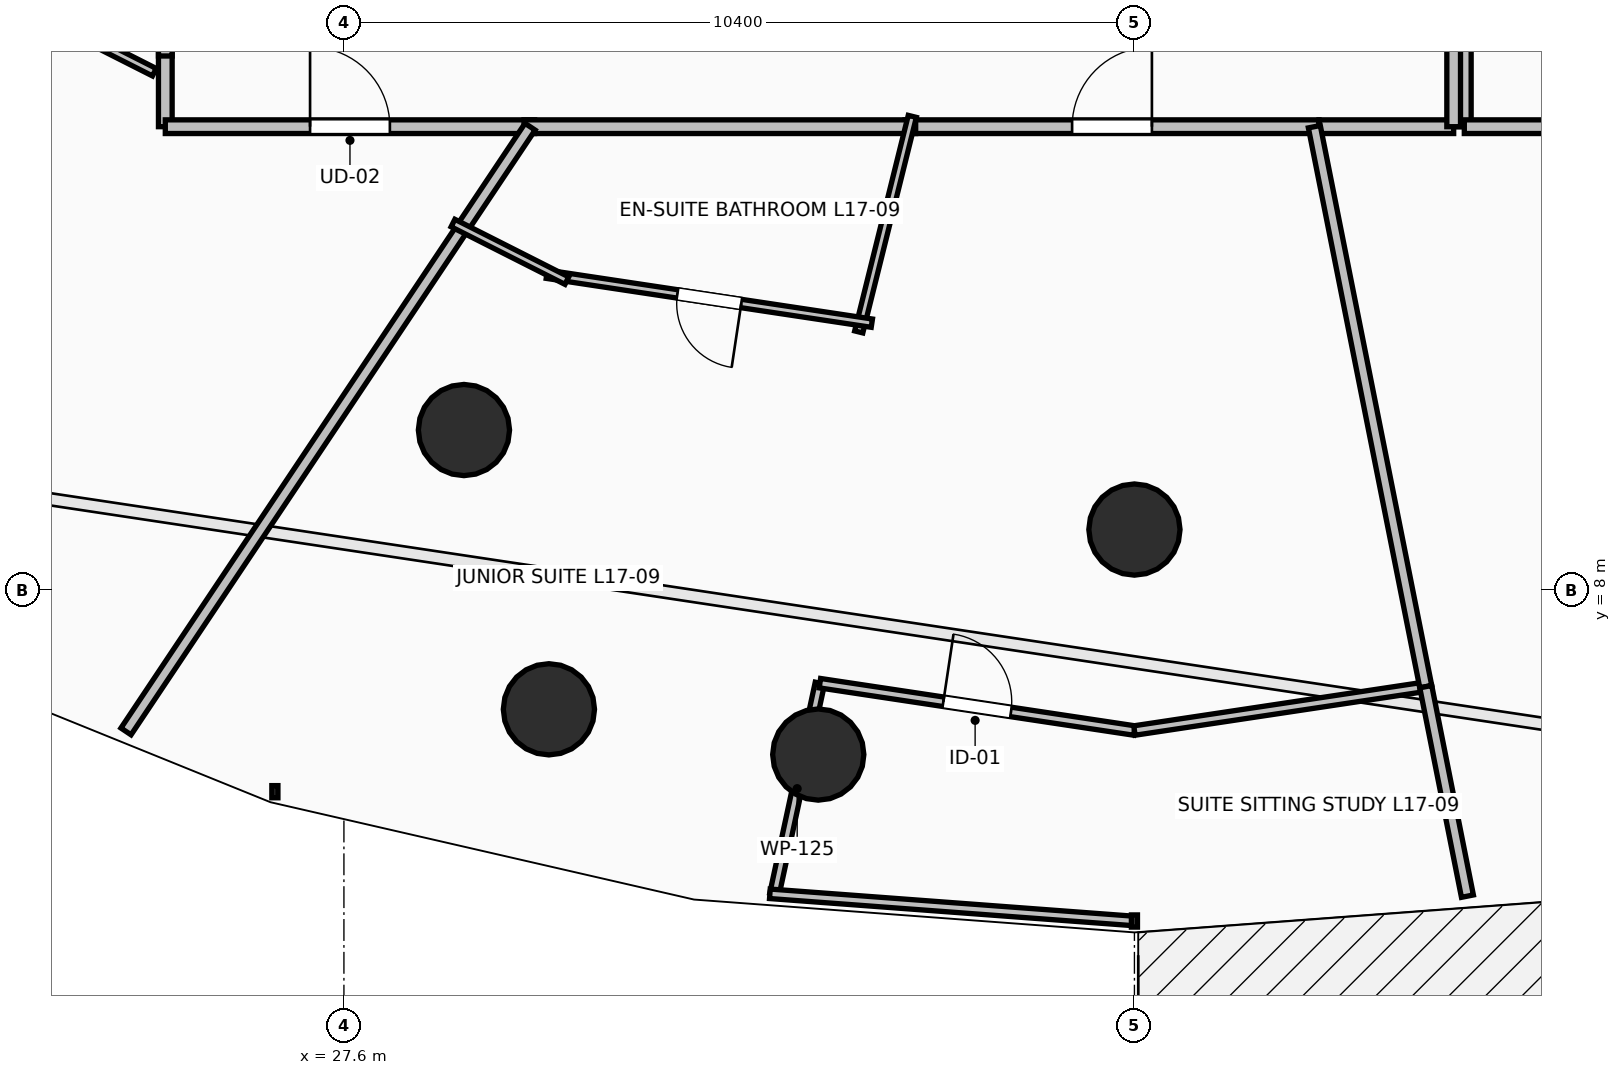
"""IFC4 building model, lengths in metres.
Left out: names, types, materials, properties, quantities, classifications, styles, units other than length and angle.
Written with IfcOpenShell. Run it as: python <this file> out.ifc"""

import sys

from ifc_helpers import new_model, si_unit, direction, frame, frame_2d, origin, origin_2d, place, context, subcontext, project, spatial, rectangle, circle, extrude, element, fill, save


model = new_model("IFC4")
c1 = context("Model", 3, precision=1e-05, world=origin(), true_north=direction((0.0, 1.0)))
c2 = subcontext(c1, "Body", "Model", "MODEL_VIEW")
j1 = project(units=[si_unit("LENGTHUNIT", "METRE"), si_unit("PLANEANGLEUNIT", "RADIAN")], contexts=[c1])
p1 = place(None, origin())
s1 = spatial("IfcSite", under=j1, at=p1, CompositionType="ELEMENT")
p2 = place(p1, origin())
s2 = spatial("IfcBuilding", under=s1, at=p2, CompositionType="ELEMENT")
p3 = place(p2, frame((0.0, 0.0, 66.0)))
s3 = spatial("IfcBuildingStorey", under=s2, at=p3, CompositionType="ELEMENT", Elevation=66.0)
for number, where, z_axis, x_axis in (
    (1, (29.179, 10.109, 0.0), (0.0, 0.0, 1.0), (-0.383, -0.924, 0.0)),
    (2, (38.0, 8.8, 0.0), (0.0, 0.0, 1.0), (0.0, -1.0, 0.0)),
    (3, (30.297, 6.435, 0.0), (0.0, 0.0, 1.0), (-0.383, -0.924, 0.0)),
    (4, (33.84, 5.84, 0.0), (0.0, 0.0, 1.0), (0.0, -1.0, 0.0)),
):
    element("IfcColumn", number, at=place(p3, frame(where, z_axis=z_axis, x_axis=x_axis)), inside=s3, PredefinedType="COLUMN", context=c2, shape_type="SweptSolid", body=[
        extrude(circle(Radius=0.6, at=origin_2d()), origin(), (0.0, 0.0, 1.0), 3.5),
    ])
p4 = place(p3, frame((25.25, 15.17, 0.0), z_axis=(0.0, 0.0, 1.0), x_axis=(0.0, -1.0, 0.0)))
e5 = element("IfcWall", 5, at=p4, inside=s3, PredefinedType="PARTITIONING", context=c2, shape_type="SweptSolid", body=[
    extrude(rectangle(XDim=1.07, YDim=0.18, at=frame_2d((0.535, 0.0))), origin(), (0.0, 0.0, 1.0), 2.784),
])
p5 = place(p3, frame((25.25, 14.1, 0.0), z_axis=(0.0, 0.0, 1.0), x_axis=(1.0, 0.0, 0.0)))
e6 = element("IfcWall", 6, at=p5, inside=s3, PredefinedType="PARTITIONING", context=c2, shape_type="SweptSolid", body=[
    extrude(rectangle(XDim=4.859, YDim=0.18, at=frame_2d((2.429, 0.0))), origin(), (0.0, 0.0, 1.0), 2.342),
])
p6 = place(p5, frame((1.905, 0.0, 0.0)))
e7 = element("IfcOpeningElement", 7, at=p6, cuts=e6, PredefinedType="OPENING", context=c2, shape_type="SweptSolid", body=[
    extrude(rectangle(XDim=1.05, YDim=2.2, at=frame_2d((0.525, 1.1))), frame((0.0, 0.105, 0.0), z_axis=(0.0, -1.0, 0.0), x_axis=(1.0, 0.0, 0.0)), (0.0, 0.0, 1.0), 0.21),
])
p7 = place(p3, frame((25.25, 19.257, 0.0), z_axis=(0.0, 0.0, 1.0), x_axis=(0.0, -1.0, 0.0)))
e8 = element("IfcWall", 8, at=p7, inside=s3, PredefinedType="PARTITIONING", context=c2, shape_type="SweptSolid", body=[
    extrude(rectangle(XDim=4.227, YDim=0.18, at=frame_2d((2.114, 0.0))), origin(), (0.0, 0.0, 1.0), 2.342),
])
p8 = place(p3, frame((34.982, 14.1, 0.0), z_axis=(0.0, 0.0, 1.0), x_axis=(1.0, 0.0, 0.0)))
e9 = element("IfcWall", 9, at=p8, inside=s3, PredefinedType="PARTITIONING", context=c2, shape_type="SweptSolid", body=[
    extrude(rectangle(XDim=5.446, YDim=0.18, at=frame_2d((2.723, 0.0))), origin(), (0.0, 0.0, 1.0), 3.15),
])
p9 = place(p8, frame((2.198, 0.0, 0.0)))
e10 = element("IfcOpeningElement", 10, at=p9, cuts=e9, PredefinedType="OPENING", context=c2, shape_type="SweptSolid", body=[
    extrude(rectangle(XDim=1.05, YDim=2.2, at=frame_2d((0.525, 1.1))), frame((0.0, 0.105, 0.0), z_axis=(0.0, -1.0, 0.0), x_axis=(1.0, 0.0, 0.0)), (0.0, 0.0, 1.0), 0.21),
])
p10 = place(p3, frame((29.969, 14.1, 0.0), z_axis=(0.0, 0.0, 1.0), x_axis=(1.0, 0.0, 0.0)))
e11 = element("IfcWall", 11, at=p10, inside=s3, PredefinedType="PARTITIONING", context=c2, shape_type="SweptSolid", body=[
    extrude(rectangle(XDim=5.153, YDim=0.18, at=frame_2d((2.577, 0.0))), origin(), (0.0, 0.0, 1.0), 3.15),
])
p11 = place(p3, frame((42.34, 16.24, 0.0), z_axis=(0.0, 0.0, 1.0), x_axis=(0.0, -1.0, 0.0)))
e12 = element("IfcWall", 12, at=p11, inside=s3, PredefinedType="PARTITIONING", context=c2, shape_type="SweptSolid", body=[
    extrude(rectangle(XDim=2.14, YDim=0.18, at=frame_2d((1.07, 0.0))), origin(), (0.0, 0.0, 1.0), 3.15),
])
p12 = place(p3, frame((42.34, 14.1, 0.0), z_axis=(0.0, 0.0, 1.0), x_axis=(1.0, 0.0, 0.0)))
e13 = element("IfcWall", 13, at=p12, inside=s3, PredefinedType="PARTITIONING", context=c2, shape_type="SweptSolid", body=[
    extrude(rectangle(XDim=8.41, YDim=0.18, at=frame_2d((4.205, 0.0))), origin(), (0.0, 0.0, 1.0), 2.342),
])
p13 = place(p12, frame((3.705, 0.0, 0.0)))
e14 = element("IfcOpeningElement", 14, at=p13, cuts=e13, PredefinedType="OPENING", context=c2, shape_type="SweptSolid", body=[
    extrude(rectangle(XDim=1.0, YDim=2.15, at=frame_2d((0.5, 1.075))), frame((0.0, 0.105, 0.0), z_axis=(0.0, -1.0, 0.0), x_axis=(1.0, 0.0, 0.0)), (0.0, 0.0, 1.0), 0.21),
])
p14 = place(p3, frame((40.428, 14.1, 0.0), z_axis=(0.0, 0.0, 1.0), x_axis=(1.0, 0.0, 0.0)))
e15 = element("IfcWall", 15, at=p14, inside=s3, PredefinedType="PARTITIONING", context=c2, shape_type="SweptSolid", body=[
    extrude(rectangle(XDim=1.772, YDim=0.18, at=frame_2d((0.886, 0.0))), origin(), (0.0, 0.0, 1.0), 3.15),
])
p15 = place(p3, frame((42.2, 14.1, 0.0), z_axis=(0.0, 0.0, 1.0), x_axis=(0.0, 1.0, 0.0)))
e16 = element("IfcWall", 16, at=p15, inside=s3, PredefinedType="PARTITIONING", context=c2, shape_type="SweptSolid", body=[
    extrude(rectangle(XDim=2.14, YDim=0.18, at=frame_2d((1.07, 0.0))), origin(), (0.0, 0.0, 1.0), 3.15),
])
p16 = place(p3, frame((25.106, 14.817, 0.0), z_axis=(0.0, 0.0, 1.0), x_axis=(-0.892342346526, 0.451359210161, 0.0)))
e17 = element("IfcWall", 17, at=p16, inside=s3, PredefinedType="PARTITIONING", context=c2, shape_type="SweptSolid", body=[
    extrude(rectangle(XDim=1.412, YDim=0.11, at=frame_2d((0.706, 0.0))), origin(), (0.0, 0.0, 1.0), 2.342),
])
p17 = place(p3, frame((24.733, 6.144, 0.0), z_axis=(0.0, 0.0, 1.0), x_axis=(0.555577192504, 0.831464962082, 0.0)))
e18 = element("IfcWall", 18, at=p17, inside=s3, PredefinedType="PARTITIONING", context=c2, shape_type="SweptSolid", body=[
    extrude(rectangle(XDim=9.569, YDim=0.16, at=frame_2d((4.784, 0.0))), origin(), (0.0, 0.0, 1.0), 2.342),
])
p18 = place(p3, frame((35.078, 14.236, 0.0), z_axis=(0.0, 0.0, 1.0), x_axis=(-0.241139515231, -0.97049046064, 0.0)))
e19 = element("IfcWall", 19, at=p18, inside=s3, PredefinedType="PARTITIONING", context=c2, shape_type="SweptSolid", body=[
    extrude(rectangle(XDim=2.922, YDim=0.11, at=frame_2d((1.461, 0.0))), origin(), (0.0, 0.0, 1.0), 2.784),
])
p19 = place(p3, frame((34.545, 11.515, 0.0), z_axis=(0.0, 0.0, 1.0), x_axis=(-0.98886251361, 0.148831882259, 0.0)))
e20 = element("IfcWall", 20, at=p19, inside=s3, PredefinedType="PARTITIONING", context=c2, shape_type="SweptSolid", body=[
    extrude(rectangle(XDim=4.324, YDim=0.11, at=frame_2d((2.162, 0.0))), origin(), (0.0, 0.0, 1.0), 3.15),
])
p20 = place(p19, frame((1.737, 0.0, 0.0)))
e21 = element("IfcOpeningElement", 21, at=p20, cuts=e20, PredefinedType="OPENING", context=c2, shape_type="SweptSolid", body=[
    extrude(rectangle(XDim=0.85, YDim=2.1, at=frame_2d((0.425, 1.05))), frame((0.0, 0.07, 0.0), z_axis=(0.0, -1.0, 0.0), x_axis=(1.0, 0.0, 0.0)), (0.0, 0.0, 1.0), 0.14),
])
p21 = place(p3, frame((30.533, 12.075, 0.0), z_axis=(0.0, 0.0, 1.0), x_axis=(-0.892352223768, 0.451339682209, 0.0)))
e22 = element("IfcWall", 22, at=p21, inside=s3, PredefinedType="PARTITIONING", context=c2, shape_type="SweptSolid", body=[
    extrude(rectangle(XDim=1.678, YDim=0.11, at=frame_2d((0.839, 0.0))), origin(), (0.0, 0.0, 1.0), 2.784),
])
p22 = place(p3, frame((33.264, 4.004, 0.0), z_axis=(0.0, 0.0, 1.0), x_axis=(0.210697687201, 0.977551269555, 0.0)))
e23 = element("IfcWall", 23, at=p22, inside=s3, PredefinedType="PARTITIONING", context=c2, shape_type="SweptSolid", body=[
    extrude(rectangle(XDim=2.839, YDim=0.125, at=frame_2d((1.419, 0.0))), origin(), (0.0, 0.0, 1.0), 3.15),
])
p23 = place(p3, frame((33.862, 6.779, 0.0), z_axis=(0.0, 0.0, 1.0), x_axis=(0.988853606593, -0.148891049857, 0.0)))
e24 = element("IfcWall", 24, at=p23, inside=s3, PredefinedType="PARTITIONING", context=c2, shape_type="SweptSolid", body=[
    extrude(rectangle(XDim=4.185, YDim=0.125, at=frame_2d((2.092, 0.0))), origin(), (0.0, 0.0, 1.0), 2.342),
])
p24 = place(p23, frame((1.642, 0.0, 0.0)))
e25 = element("IfcOpeningElement", 25, at=p24, cuts=e24, PredefinedType="OPENING", context=c2, shape_type="SweptSolid", body=[
    extrude(rectangle(XDim=0.9, YDim=2.1, at=frame_2d((0.45, 1.05))), frame((0.0, 0.077, 0.0), z_axis=(0.0, -1.0, 0.0), x_axis=(1.0, 0.0, 0.0)), (0.0, 0.0, 1.0), 0.155),
])
p25 = place(p3, frame((38.0, 6.156, 0.0), z_axis=(0.0, 0.0, 1.0), x_axis=(0.988862311426, 0.148833225599, 0.0)))
e26 = element("IfcWall", 26, at=p25, inside=s3, PredefinedType="PARTITIONING", context=c2, shape_type="SweptSolid", body=[
    extrude(rectangle(XDim=3.876, YDim=0.125, at=frame_2d((1.938, 0.0))), origin(), (0.0, 0.0, 1.0), 2.534),
])
p26 = place(p3, frame((33.204, 4.008, 0.0), z_axis=(0.0, 0.0, 1.0), x_axis=(0.99722311136, -0.074471915311, 0.0)))
e27 = element("IfcWall", 27, at=p26, inside=s3, PredefinedType="PARTITIONING", context=c2, shape_type="SweptSolid", body=[
    extrude(rectangle(XDim=4.809, YDim=0.125, at=frame_2d((2.405, 0.0))), origin(), (0.0, 0.0, 1.0), 3.15),
])
p27 = place(p3, frame((41.833, 6.733, 0.0), z_axis=(0.0, 0.0, 1.0), x_axis=(-0.195172247164, 0.980768980921, 0.0)))
e28 = element("IfcWall", 28, at=p27, inside=s3, PredefinedType="PARTITIONING", context=c2, shape_type="SweptSolid", body=[
    extrude(rectangle(XDim=7.512, YDim=0.16, at=frame_2d((3.756, 0.0))), origin(), (0.0, 0.0, 1.0), 2.342),
])
p28 = place(p3, frame((42.381, 3.977, 0.0), z_axis=(0.0, 0.0, 1.0), x_axis=(-0.195063341769, 0.980790646722, 0.0)))
e29 = element("IfcWall", 29, at=p28, inside=s3, PredefinedType="PARTITIONING", context=c2, shape_type="SweptSolid", body=[
    extrude(rectangle(XDim=2.81, YDim=0.16, at=frame_2d((1.405, 0.0))), origin(), (0.0, 0.0, 1.0), 2.534),
])
p29 = place(p6, origin())
e30 = element("IfcDoor", 30, at=p29, inside=s3, OperationType="SINGLE_SWING_LEFT", PredefinedType="DOOR", context=c2, shape_type="SweptSolid", body=[
    extrude(rectangle(XDim=1.05, YDim=2.2, at=frame_2d((0.525, 1.1))), frame((0.0, 0.025, 0.0), z_axis=(0.0, -1.0, 0.0), x_axis=(1.0, 0.0, 0.0)), (0.0, 0.0, 1.0), 0.05),
])
fill(e7, e30)
p30 = place(p9, origin())
e31 = element("IfcDoor", 31, at=p30, inside=s3, OperationType="SINGLE_SWING_RIGHT", PredefinedType="DOOR", context=c2, shape_type="SweptSolid", body=[
    extrude(rectangle(XDim=1.05, YDim=2.2, at=frame_2d((0.525, 1.1))), frame((0.0, 0.025, 0.0), z_axis=(0.0, -1.0, 0.0), x_axis=(1.0, 0.0, 0.0)), (0.0, 0.0, 1.0), 0.05),
])
fill(e10, e31)
p31 = place(p20, origin())
e32 = element("IfcDoor", 32, at=p31, inside=s3, OperationType="SINGLE_SWING_LEFT", PredefinedType="DOOR", context=c2, shape_type="SweptSolid", body=[
    extrude(rectangle(XDim=0.85, YDim=2.1, at=frame_2d((0.425, 1.05))), frame((0.0, 0.025, 0.0), z_axis=(0.0, -1.0, 0.0), x_axis=(1.0, 0.0, 0.0)), (0.0, 0.0, 1.0), 0.05),
])
fill(e21, e32)
p32 = place(p24, origin())
e33 = element("IfcDoor", 33, at=p32, inside=s3, OperationType="SINGLE_SWING_LEFT", PredefinedType="DOOR", context=c2, shape_type="SweptSolid", body=[
    extrude(rectangle(XDim=0.9, YDim=2.1, at=frame_2d((0.45, 1.05))), frame((0.0, 0.025, 0.0), z_axis=(0.0, -1.0, 0.0), x_axis=(1.0, 0.0, 0.0)), (0.0, 0.0, 1.0), 0.05),
])
fill(e25, e33)
save(model, sys.argv[1])
